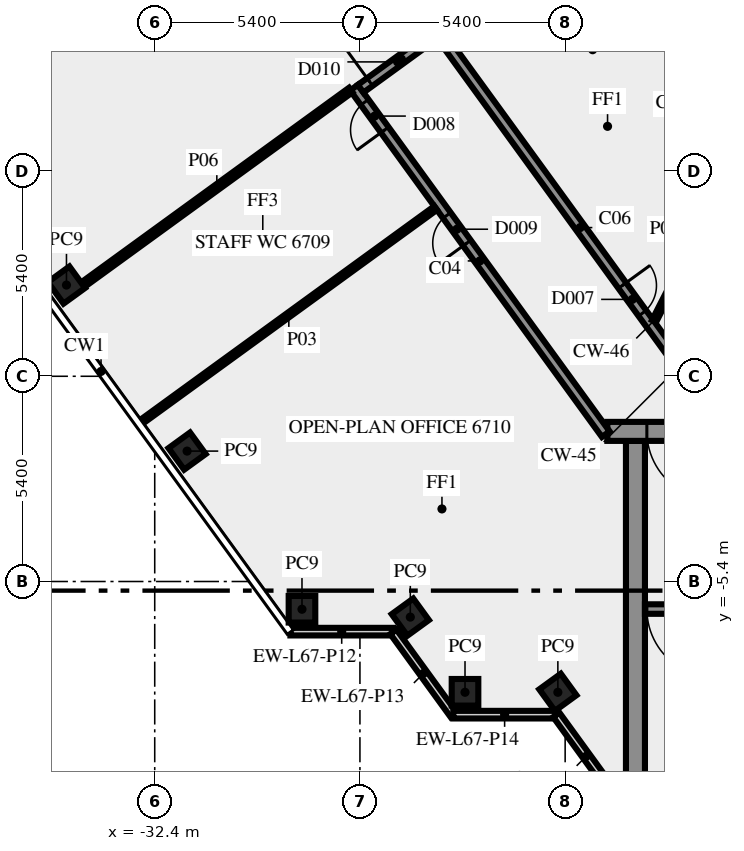
"""IFC4 building model, lengths in metres.
Left out: names, types, materials, properties, quantities, classifications, styles, units other than length and angle.
Written with IfcOpenShell. Run it as: python <this file> out.ifc"""

import sys

from ifc_helpers import new_model, si_unit, direction, frame, frame_2d, origin, origin_2d, place, context, subcontext, project, spatial, rectangle, extrude, element, fill, save


model = new_model("IFC4")
c1 = context("Model", 3, precision=1e-05, world=origin(), true_north=direction((0.0, 1.0)))
c2 = subcontext(c1, "Body", "Model", "MODEL_VIEW")
j1 = project(units=[si_unit("LENGTHUNIT", "METRE"), si_unit("PLANEANGLEUNIT", "RADIAN")], contexts=[c1])
p1 = place(None, origin())
s1 = spatial("IfcSite", under=j1, at=p1, CompositionType="ELEMENT")
p2 = place(p1, origin())
s2 = spatial("IfcBuilding", under=s1, at=p2, CompositionType="ELEMENT")
p3 = place(p2, frame((0.0, 0.0, 289.0)))
s3 = spatial("IfcBuildingStorey", under=s2, at=p3, CompositionType="ELEMENT", Elevation=289.0)
for number, where, z_axis, x_axis in (
    (1, (-34.722, 2.4, 0.0), (0.0, 0.0, 1.0), (0.588, -0.809, 0.0)),
    (2, (-31.548, -1.969, 0.0), (0.0, 0.0, 1.0), (0.588, -0.809, 0.0)),
    (3, (-28.525, -6.13, 0.0), (0.0, 0.0, 1.0), (1.0, 0.0, 0.0)),
    (4, (-25.674, -6.337, 0.0), (0.0, 0.0, 1.0), (0.588, -0.809, 0.0)),
    (5, (-24.235, -8.315, 0.0), (0.0, 0.0, 1.0), (1.0, 0.0, 0.0)),
    (6, (-21.792, -8.315, 0.0), (0.0, 0.0, 1.0), (0.588, -0.809, 0.0)),
):
    element("IfcColumn", number, at=place(p3, frame(where, z_axis=z_axis, x_axis=x_axis)), inside=s3, PredefinedType="COLUMN", context=c2, shape_type="SweptSolid", body=[
        extrude(rectangle(XDim=0.7, YDim=0.7, at=origin_2d()), origin(), (0.0, 0.0, 1.0), 3.65),
    ])
p4 = place(p3, frame((-28.83, -6.719, 0.0), z_axis=(0.0, 0.0, 1.0), x_axis=(1.0, 0.0, 0.0)))
e7 = element("IfcWall", 7, at=p4, inside=s3, PredefinedType="SOLIDWALL", context=c2, shape_type="SweptSolid", body=[
    extrude(rectangle(XDim=2.7, YDim=0.2, at=frame_2d((1.35, 0.0))), origin(), (0.0, 0.0, 1.0), 3.65),
])
p5 = place(p3, frame((-26.12, -6.724, 0.0), z_axis=(0.0, 0.0, 1.0), x_axis=(0.587720002413, -0.809064397168, 0.0)))
e8 = element("IfcWall", 8, at=p5, inside=s3, PredefinedType="SOLIDWALL", context=c2, shape_type="SweptSolid", body=[
    extrude(rectangle(XDim=2.7, YDim=0.2, at=frame_2d((1.35, 0.0))), origin(), (0.0, 0.0, 1.0), 3.65),
])
p6 = place(p3, frame((-24.543, -8.904, 0.0), z_axis=(0.0, 0.0, 1.0), x_axis=(1.0, 0.0, 0.0)))
e9 = element("IfcWall", 9, at=p6, inside=s3, PredefinedType="SOLIDWALL", context=c2, shape_type="SweptSolid", body=[
    extrude(rectangle(XDim=2.7, YDim=0.2, at=frame_2d((1.35, 0.0))), origin(), (0.0, 0.0, 1.0), 3.65),
])
p7 = place(p3, frame((-21.833, -8.909, 0.0), z_axis=(0.0, 0.0, 1.0), x_axis=(0.587766567315, -0.809030569476, 0.0)))
e10 = element("IfcWall", 10, at=p7, inside=s3, PredefinedType="SOLIDWALL", context=c2, shape_type="SweptSolid", body=[
    extrude(rectangle(XDim=2.688, YDim=0.2, at=frame_2d((1.344, 0.0))), origin(), (0.0, 0.0, 1.0), 3.65),
])
p8 = place(p3, frame((-19.75, -10.5, 0.0), z_axis=(0.0, 0.0, 1.0), x_axis=(0.0, 1.0, 0.0)))
e11 = element("IfcWall", 11, at=p8, inside=s3, PredefinedType="SHEAR", context=c2, shape_type="SweptSolid", body=[
    extrude(rectangle(XDim=8.8, YDim=0.5, at=frame_2d((4.4, 0.0))), origin(), (0.0, 0.0, 1.0), 3.65),
])
p9 = place(p3, frame((-11.45, -6.125, 0.0), z_axis=(0.0, 0.0, 1.0), x_axis=(-1.0, 0.0, 0.0)))
e12 = element("IfcWall", 12, at=p9, inside=s3, PredefinedType="SHEAR", context=c2, shape_type="SweptSolid", body=[
    extrude(rectangle(XDim=8.05, YDim=0.25, at=frame_2d((4.025, 0.0))), origin(), (0.0, 0.0, 1.0), 3.65),
])
p10 = place(p9, frame((6.2, 0.0, 0.0)))
e13 = element("IfcOpeningElement", 13, at=p10, cuts=e12, PredefinedType="OPENING", context=c2, shape_type="SweptSolid", body=[
    extrude(rectangle(XDim=1.8, YDim=2.1, at=frame_2d((0.9, 1.05))), frame((0.0, 0.135, 0.0), z_axis=(0.0, -1.0, 0.0), x_axis=(1.0, 0.0, 0.0)), (0.0, 0.0, 1.0), 0.27),
])
p11 = place(p3, frame((20.49, -1.45, 0.0), z_axis=(0.0, 0.0, 1.0), x_axis=(-1.0, 0.0, 0.0)))
e14 = element("IfcWall", 14, at=p11, inside=s3, PredefinedType="SHEAR", context=c2, shape_type="SweptSolid", body=[
    extrude(rectangle(XDim=40.98, YDim=0.5, at=frame_2d((20.49, 0.0))), origin(), (0.0, 0.0, 1.0), 3.65),
])
p12 = place(p11, frame((38.14, 0.0, 0.0)))
e15 = element("IfcOpeningElement", 15, at=p12, cuts=e14, PredefinedType="OPENING", context=c2, shape_type="SweptSolid", body=[
    extrude(rectangle(XDim=1.8, YDim=2.1, at=frame_2d((0.9, 1.05))), frame((0.0, 0.26, 0.0), z_axis=(0.0, -1.0, 0.0), x_axis=(1.0, 0.0, 0.0)), (0.0, 0.0, 1.0), 0.52),
])
p13 = place(p11, frame((35.89, 0.0, 0.0)))
e16 = element("IfcOpeningElement", 16, at=p13, cuts=e14, PredefinedType="OPENING", context=c2, shape_type="SweptSolid", body=[
    extrude(rectangle(XDim=0.9, YDim=2.1, at=frame_2d((0.45, 1.05))), frame((0.0, 0.26, 0.0), z_axis=(0.0, -1.0, 0.0), x_axis=(1.0, 0.0, 0.0)), (0.0, 0.0, 1.0), 0.52),
])
p14 = place(p11, frame((32.94, 0.0, 0.0)))
e17 = element("IfcOpeningElement", 17, at=p14, cuts=e14, PredefinedType="OPENING", context=c2, shape_type="SweptSolid", body=[
    extrude(rectangle(XDim=0.9, YDim=2.1, at=frame_2d((0.45, 1.05))), frame((0.0, 0.26, 0.0), z_axis=(0.0, -1.0, 0.0), x_axis=(1.0, 0.0, 0.0)), (0.0, 0.0, 1.0), 0.52),
])
p15 = place(p11, frame((31.015, 0.0, 0.0)))
e18 = element("IfcOpeningElement", 18, at=p15, cuts=e14, PredefinedType="OPENING", context=c2, shape_type="SweptSolid", body=[
    extrude(rectangle(XDim=0.8, YDim=2.1, at=frame_2d((0.4, 1.05))), frame((0.0, 0.26, 0.0), z_axis=(0.0, -1.0, 0.0), x_axis=(1.0, 0.0, 0.0)), (0.0, 0.0, 1.0), 0.52),
])
p16 = place(p11, frame((24.765, 0.0, 0.0)))
e19 = element("IfcOpeningElement", 19, at=p16, cuts=e14, PredefinedType="OPENING", context=c2, shape_type="SweptSolid", body=[
    extrude(rectangle(XDim=0.8, YDim=2.1, at=frame_2d((0.4, 1.05))), frame((0.0, 0.26, 0.0), z_axis=(0.0, -1.0, 0.0), x_axis=(1.0, 0.0, 0.0)), (0.0, 0.0, 1.0), 0.52),
])
p17 = place(p11, frame((21.765, 0.0, 0.0)))
e20 = element("IfcOpeningElement", 20, at=p17, cuts=e14, PredefinedType="OPENING", context=c2, shape_type="SweptSolid", body=[
    extrude(rectangle(XDim=2.0, YDim=2.1, at=frame_2d((1.0, 1.05))), frame((0.0, 0.26, 0.0), z_axis=(0.0, -1.0, 0.0), x_axis=(1.0, 0.0, 0.0)), (0.0, 0.0, 1.0), 0.52),
])
p18 = place(p11, frame((15.202, 0.0, 0.0)))
e21 = element("IfcOpeningElement", 21, at=p18, cuts=e14, PredefinedType="OPENING", context=c2, shape_type="SweptSolid", body=[
    extrude(rectangle(XDim=0.9, YDim=2.1, at=frame_2d((0.45, 1.05))), frame((0.0, 0.26, 0.0), z_axis=(0.0, -1.0, 0.0), x_axis=(1.0, 0.0, 0.0)), (0.0, 0.0, 1.0), 0.52),
])
p19 = place(p11, frame((13.54, 0.0, 0.0)))
e22 = element("IfcOpeningElement", 22, at=p19, cuts=e14, PredefinedType="OPENING", context=c2, shape_type="SweptSolid", body=[
    extrude(rectangle(XDim=0.9, YDim=2.1, at=frame_2d((0.45, 1.05))), frame((0.0, 0.26, 0.0), z_axis=(0.0, -1.0, 0.0), x_axis=(1.0, 0.0, 0.0)), (0.0, 0.0, 1.0), 0.52),
])
p20 = place(p11, frame((11.64, 0.0, 0.0)))
e23 = element("IfcOpeningElement", 23, at=p20, cuts=e14, PredefinedType="OPENING", context=c2, shape_type="SweptSolid", body=[
    extrude(rectangle(XDim=0.9, YDim=2.1, at=frame_2d((0.45, 1.05))), frame((0.0, 0.26, 0.0), z_axis=(0.0, -1.0, 0.0), x_axis=(1.0, 0.0, 0.0)), (0.0, 0.0, 1.0), 0.52),
])
p21 = place(p11, frame((9.577, 0.0, 0.0)))
e24 = element("IfcOpeningElement", 24, at=p21, cuts=e14, PredefinedType="OPENING", context=c2, shape_type="SweptSolid", body=[
    extrude(rectangle(XDim=0.9, YDim=2.1, at=frame_2d((0.45, 1.05))), frame((0.0, 0.26, 0.0), z_axis=(0.0, -1.0, 0.0), x_axis=(1.0, 0.0, 0.0)), (0.0, 0.0, 1.0), 0.52),
])
p22 = place(p11, frame((7.14, 0.0, 0.0)))
e25 = element("IfcOpeningElement", 25, at=p22, cuts=e14, PredefinedType="OPENING", context=c2, shape_type="SweptSolid", body=[
    extrude(rectangle(XDim=0.9, YDim=2.1, at=frame_2d((0.45, 1.05))), frame((0.0, 0.26, 0.0), z_axis=(0.0, -1.0, 0.0), x_axis=(1.0, 0.0, 0.0)), (0.0, 0.0, 1.0), 0.52),
])
p23 = place(p11, frame((5.028, 0.0, 0.0)))
e26 = element("IfcOpeningElement", 26, at=p23, cuts=e14, PredefinedType="OPENING", context=c2, shape_type="SweptSolid", body=[
    extrude(rectangle(XDim=0.8, YDim=2.1, at=frame_2d((0.4, 1.05))), frame((0.0, 0.26, 0.0), z_axis=(0.0, -1.0, 0.0), x_axis=(1.0, 0.0, 0.0)), (0.0, 0.0, 1.0), 0.52),
])
p24 = place(p11, frame((3.452, 0.0, 0.0)))
e27 = element("IfcOpeningElement", 27, at=p24, cuts=e14, PredefinedType="OPENING", context=c2, shape_type="SweptSolid", body=[
    extrude(rectangle(XDim=0.8, YDim=2.1, at=frame_2d((0.4, 1.05))), frame((0.0, 0.26, 0.0), z_axis=(0.0, -1.0, 0.0), x_axis=(1.0, 0.0, 0.0)), (0.0, 0.0, 1.0), 0.52),
])
p25 = place(p11, frame((1.04, 0.0, 0.0)))
e28 = element("IfcOpeningElement", 28, at=p25, cuts=e14, PredefinedType="OPENING", context=c2, shape_type="SweptSolid", body=[
    extrude(rectangle(XDim=1.8, YDim=2.1, at=frame_2d((0.9, 1.05))), frame((0.0, 0.26, 0.0), z_axis=(0.0, -1.0, 0.0), x_axis=(1.0, 0.0, 0.0)), (0.0, 0.0, 1.0), 0.52),
])
p26 = place(p3, frame((-20.531, -1.523, 0.0), z_axis=(0.0, 0.0, 1.0), x_axis=(-0.587782646447, 0.809018887626, 0.0)))
e29 = element("IfcWall", 29, at=p26, inside=s3, PredefinedType="SOLIDWALL", context=c2, shape_type="SweptSolid", body=[
    extrude(rectangle(XDim=11.27, YDim=0.25, at=frame_2d((5.635, 0.0))), origin(), (0.0, 0.0, 1.0), 3.65),
])
p27 = place(p26, frame((6.216, 0.0, 0.0)))
e30 = element("IfcOpeningElement", 30, at=p27, cuts=e29, PredefinedType="OPENING", context=c2, shape_type="SweptSolid", body=[
    extrude(rectangle(XDim=0.9, YDim=2.1, at=frame_2d((0.45, 1.05))), frame((0.0, 0.135, 0.0), z_axis=(0.0, -1.0, 0.0), x_axis=(1.0, 0.0, 0.0)), (0.0, 0.0, 1.0), 0.27),
])
p28 = place(p26, frame((9.896, 0.0, 0.0)))
e31 = element("IfcOpeningElement", 31, at=p28, cuts=e29, PredefinedType="OPENING", context=c2, shape_type="SweptSolid", body=[
    extrude(rectangle(XDim=0.9, YDim=2.1, at=frame_2d((0.45, 1.05))), frame((0.0, 0.135, 0.0), z_axis=(0.0, -1.0, 0.0), x_axis=(1.0, 0.0, 0.0)), (0.0, 0.0, 1.0), 0.27),
])
p29 = place(p3, frame((-26.981, 7.567, 0.0), z_axis=(0.0, 0.0, 1.0), x_axis=(0.809038743598, 0.587755315891, 0.0)))
e32 = element("IfcWall", 32, at=p29, inside=s3, PredefinedType="SOLIDWALL", context=c2, shape_type="SweptSolid", body=[
    extrude(rectangle(XDim=2.65, YDim=0.25, at=frame_2d((1.325, 0.0))), origin(), (0.0, 0.0, 1.0), 3.65),
])
p30 = place(p29, frame((0.3, 0.0, 0.0)))
e33 = element("IfcOpeningElement", 33, at=p30, cuts=e32, PredefinedType="OPENING", context=c2, shape_type="SweptSolid", body=[
    extrude(rectangle(XDim=1.8, YDim=2.1, at=frame_2d((0.9, 1.05))), frame((0.0, 0.135, 0.0), z_axis=(0.0, -1.0, 0.0), x_axis=(1.0, 0.0, 0.0)), (0.0, 0.0, 1.0), 0.27),
])
p31 = place(p3, frame((-24.865, 8.95, 0.0), z_axis=(0.0, 0.0, 1.0), x_axis=(0.587791617212, -0.809012369952, 0.0)))
e34 = element("IfcWall", 34, at=p31, inside=s3, PredefinedType="SOLIDWALL", context=c2, shape_type="SweptSolid", body=[
    extrude(rectangle(XDim=12.453, YDim=0.25, at=frame_2d((6.227, 0.0))), origin(), (0.0, 0.0, 1.0), 3.65),
])
p32 = place(p31, frame((8.112, 0.0, 0.0)))
e35 = element("IfcOpeningElement", 35, at=p32, cuts=e34, PredefinedType="OPENING", context=c2, shape_type="SweptSolid", body=[
    extrude(rectangle(XDim=0.9, YDim=2.1, at=frame_2d((0.45, 1.05))), frame((0.0, 0.135, 0.0), z_axis=(0.0, -1.0, 0.0), x_axis=(1.0, 0.0, 0.0)), (0.0, 0.0, 1.0), 0.27),
])
p33 = place(p3, frame((-25.008, 4.427, 0.0), z_axis=(0.0, 0.0, 1.0), x_axis=(-0.808994684961, -0.587815957341, 0.0)))
e36 = element("IfcWall", 36, at=p33, inside=s3, PredefinedType="PARTITIONING", context=c2, shape_type="SweptSolid", body=[
    extrude(rectangle(XDim=9.55, YDim=0.12, at=frame_2d((4.775, 0.0))), origin(), (0.0, 0.0, 1.0), 2.95),
])
p34 = place(p3, frame((-34.291, 2.41, 0.0), z_axis=(0.0, 0.0, 1.0), x_axis=(0.809027940177, 0.587770186393, 0.0)))
e37 = element("IfcWall", 37, at=p34, inside=s3, PredefinedType="PARTITIONING", context=c2, shape_type="SweptSolid", body=[
    extrude(rectangle(XDim=8.715, YDim=0.15, at=frame_2d((4.357, 0.0))), origin(), (0.0, 0.0, 1.0), 3.65),
])
p35 = place(p3, frame((-19.261, 1.45, 0.0), z_axis=(0.0, 0.0, 1.0), x_axis=(0.453950796792, 0.891026752736, 0.0)))
e38 = element("IfcWall", 38, at=p35, inside=s3, PredefinedType="PARTITIONING", context=c2, shape_type="SweptSolid", body=[
    extrude(rectangle(XDim=2.778, YDim=0.12, at=frame_2d((1.389, 0.0))), origin(), (0.0, 0.0, 1.0), 3.65),
])
p36 = place(p10, origin())
e39 = element("IfcDoor", 39, at=p36, inside=s3, OperationType="DOUBLE_DOOR_SINGLE_SWING", PredefinedType="DOOR", context=c2, shape_type="SweptSolid", body=[
    extrude(rectangle(XDim=1.8, YDim=2.1, at=frame_2d((0.9, 1.05))), frame((0.0, 0.025, 0.0), z_axis=(0.0, -1.0, 0.0), x_axis=(1.0, 0.0, 0.0)), (0.0, 0.0, 1.0), 0.05),
])
fill(e13, e39)
p37 = place(p12, origin())
e40 = element("IfcDoor", 40, at=p37, inside=s3, OperationType="DOUBLE_DOOR_SINGLE_SWING", PredefinedType="DOOR", context=c2, shape_type="SweptSolid", body=[
    extrude(rectangle(XDim=1.8, YDim=2.1, at=frame_2d((0.9, 1.05))), frame((0.0, 0.025, 0.0), z_axis=(0.0, -1.0, 0.0), x_axis=(1.0, 0.0, 0.0)), (0.0, 0.0, 1.0), 0.05),
])
fill(e15, e40)
p38 = place(p32, origin())
e41 = element("IfcDoor", 41, at=p38, inside=s3, OperationType="SINGLE_SWING_RIGHT", PredefinedType="DOOR", context=c2, shape_type="SweptSolid", body=[
    extrude(rectangle(XDim=0.9, YDim=2.1, at=frame_2d((0.45, 1.05))), frame((0.0, 0.025, 0.0), z_axis=(0.0, -1.0, 0.0), x_axis=(1.0, 0.0, 0.0)), (0.0, 0.0, 1.0), 0.05),
])
fill(e35, e41)
p39 = place(p27, origin())
e42 = element("IfcDoor", 42, at=p39, inside=s3, OperationType="SINGLE_SWING_RIGHT", PredefinedType="DOOR", context=c2, shape_type="SweptSolid", body=[
    extrude(rectangle(XDim=0.9, YDim=2.1, at=frame_2d((0.45, 1.05))), frame((0.0, 0.025, 0.0), z_axis=(0.0, -1.0, 0.0), x_axis=(1.0, 0.0, 0.0)), (0.0, 0.0, 1.0), 0.05),
])
fill(e30, e42)
p40 = place(p30, origin())
e43 = element("IfcDoor", 43, at=p40, inside=s3, OperationType="DOUBLE_DOOR_SINGLE_SWING", PredefinedType="DOOR", context=c2, shape_type="SweptSolid", body=[
    extrude(rectangle(XDim=1.8, YDim=2.1, at=frame_2d((0.9, 1.05))), frame((0.0, 0.025, 0.0), z_axis=(0.0, -1.0, 0.0), x_axis=(1.0, 0.0, 0.0)), (0.0, 0.0, 1.0), 0.05),
])
fill(e33, e43)
p41 = place(p28, origin())
e44 = element("IfcDoor", 44, at=p41, inside=s3, OperationType="SINGLE_SWING_RIGHT", PredefinedType="DOOR", context=c2, shape_type="SweptSolid", body=[
    extrude(rectangle(XDim=0.9, YDim=2.1, at=frame_2d((0.45, 1.05))), frame((0.0, 0.025, 0.0), z_axis=(0.0, -1.0, 0.0), x_axis=(1.0, 0.0, 0.0)), (0.0, 0.0, 1.0), 0.05),
])
fill(e31, e44)
save(model, sys.argv[1])
